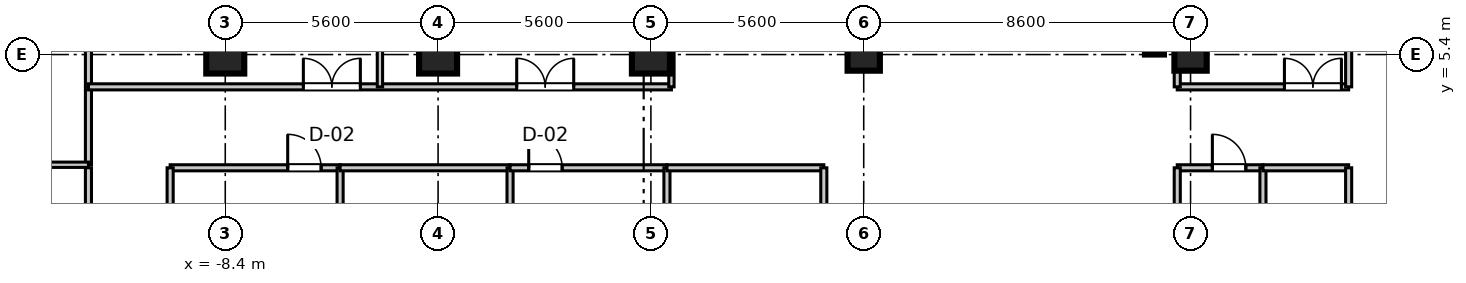
"""IFC4 building model, lengths in metres.
Left out: names, types, materials, properties, quantities, classifications, styles, units other than length and angle.
Written with IfcOpenShell. Run it as: python <this file> out.ifc"""

import sys

from ifc_helpers import new_model, si_unit, direction, frame, frame_2d, origin, origin_2d, place, context, subcontext, project, spatial, rectangle, extrude, source, transform, mapped, element, fill, save


model = new_model("IFC4")
c1 = context("Model", 3, precision=1e-05, world=origin(), true_north=direction((0.0, 1.0)))
c2 = subcontext(c1, "Body", "Model", "MODEL_VIEW")
j1 = project(units=[si_unit("LENGTHUNIT", "METRE"), si_unit("PLANEANGLEUNIT", "RADIAN")], contexts=[c1])
p1 = place(None, origin())
s1 = spatial("IfcSite", under=j1, at=p1, CompositionType="ELEMENT")
p2 = place(p1, origin())
s2 = spatial("IfcBuilding", under=s1, at=p2, CompositionType="ELEMENT")
p3 = place(p2, frame((0.0, 0.0, 212.3)))
s3 = spatial("IfcBuildingStorey", under=s2, at=p3, CompositionType="ELEMENT", Elevation=212.3)
m1 = source(origin(), c2, "Body", "SweptSolid", [
    extrude(rectangle(XDim=1.0, YDim=1.0, at=origin_2d()), origin(), (0.0, 0.0, 1.0), 3.655),
])
for number, where, z_axis, x_axis in (
    (1, (-8.4, 5.4, 0.0), (0.0, 0.0, 1.0), (1.0, 0.0, 0.0)),
    (2, (-2.8, 5.4, 0.0), (0.0, 0.0, 1.0), (1.0, 0.0, 0.0)),
    (3, (2.8, 5.4, 0.0), (0.0, 0.0, 1.0), (1.0, 0.0, 0.0)),
):
    element("IfcColumn", number, at=place(p3, frame(where, z_axis=z_axis, x_axis=x_axis)), inside=s3, PredefinedType="COLUMN", context=c2, shape_type="MappedRepresentation", body=[
        mapped(m1, transform((0.0, 0.0, 0.0), scale=1.0)),
    ])
m2 = source(origin(), c2, "Body", "SweptSolid", [
    extrude(rectangle(XDim=0.85, YDim=0.85, at=origin_2d()), origin(), (0.0, 0.0, 1.0), 3.655),
])
for number, where, z_axis, x_axis in (
    (4, (8.4, 5.4, 0.0), (0.0, 0.0, 1.0), (1.0, 0.0, 0.0)),
    (5, (17.0, 5.4, 0.0), (0.0, 0.0, 1.0), (1.0, 0.0, 0.0)),
):
    element("IfcColumn", number, at=place(p3, frame(where, z_axis=z_axis, x_axis=x_axis)), inside=s3, PredefinedType="PILASTER", context=c2, shape_type="MappedRepresentation", body=[
        mapped(m2, transform((0.0, 0.0, 0.0), scale=1.0)),
    ])
m3 = source(origin(), c2, "Body", "SweptSolid", [
    extrude(rectangle(XDim=11.6, YDim=0.5, at=frame_2d((5.8, 0.0))), origin(), (0.0, 0.0, 1.0), 3.41),
])
p4 = place(p3, frame((16.05, 5.4, 0.0), z_axis=(0.0, 0.0, 1.0), x_axis=(0.0, 1.0, 0.0)))
e6 = element("IfcWall", 6, at=p4, inside=s3, PredefinedType="SHEAR", context=c2, shape_type="MappedRepresentation", body=[
    mapped(m3, transform((0.0, 0.0, 0.0), scale=1.0)),
])
m4 = source(origin(), c2, "Body", "SweptSolid", [
    extrude(rectangle(XDim=4.51, YDim=0.16, at=frame_2d((2.255, 0.0))), origin(), (0.0, 0.0, 1.0), 2.75),
])
p5 = place(p3, frame((16.65, 4.55, 0.0), z_axis=(0.0, 0.0, 1.0), x_axis=(1.0, 0.0, 0.0)))
e7 = element("IfcWall", 7, at=p5, inside=s3, PredefinedType="PARTITIONING", context=c2, shape_type="MappedRepresentation", body=[
    mapped(m4, transform((0.0, 0.0, 0.0), scale=1.0)),
])
p6 = place(p5, frame((2.82, 0.0, 0.0)))
e8 = element("IfcOpeningElement", 8, at=p6, cuts=e7, PredefinedType="OPENING", context=c2, shape_type="SweptSolid", body=[
    extrude(rectangle(XDim=1.5, YDim=2.15, at=frame_2d((0.75, 1.075))), frame((0.0, 0.09, 0.0), z_axis=(0.0, -1.0, 0.0), x_axis=(1.0, 0.0, 0.0)), (0.0, 0.0, 1.0), 0.18),
])
m5 = source(origin(), c2, "Body", "SweptSolid", [
    extrude(rectangle(XDim=19.35, YDim=0.16, at=frame_2d((9.675, 0.0))), origin(), (0.0, 0.0, 1.0), 2.75),
])
p7 = place(p3, frame((16.65, 4.55, 0.0), z_axis=(0.0, 0.0, 1.0), x_axis=(0.0, 1.0, 0.0)))
e9 = element("IfcWall", 9, at=p7, inside=s3, PredefinedType="PARTITIONING", context=c2, shape_type="MappedRepresentation", body=[
    mapped(m5, transform((0.0, 0.0, 0.0), scale=1.0)),
])
m6 = source(origin(), c2, "Body", "SweptSolid", [
    extrude(rectangle(XDim=17.93, YDim=0.16, at=frame_2d((8.965, 0.0))), origin(), (0.0, 0.0, 1.0), 2.75),
])
p8 = place(p3, frame((21.16, 4.55, 0.0), z_axis=(0.0, 0.0, 1.0), x_axis=(0.0, 1.0, 0.0)))
e10 = element("IfcWall", 10, at=p8, inside=s3, PredefinedType="PARTITIONING", context=c2, shape_type="MappedRepresentation", body=[
    mapped(m6, transform((0.0, 0.0, 0.0), scale=1.0)),
])
m7 = source(origin(), c2, "Body", "SweptSolid", [
    extrude(rectangle(XDim=21.4, YDim=0.16, at=frame_2d((10.7, 0.0))), origin(), (0.0, 0.0, 1.0), 2.75),
])
p9 = place(p3, frame((-12.0, 2.5, 0.0), z_axis=(0.0, 0.0, 1.0), x_axis=(0.0, 1.0, 0.0)))
e11 = element("IfcWall", 11, at=p9, inside=s3, PredefinedType="PARTITIONING", context=c2, shape_type="MappedRepresentation", body=[
    mapped(m7, transform((0.0, 0.0, 0.0), scale=1.0)),
])
p10 = place(p9, frame((8.15, 0.0, 0.0)))
e12 = element("IfcOpeningElement", 12, at=p10, cuts=e11, PredefinedType="OPENING", context=c2, shape_type="SweptSolid", body=[
    extrude(rectangle(XDim=0.95, YDim=2.1, at=frame_2d((0.475, 1.05))), frame((0.0, 0.09, 0.0), z_axis=(0.0, -1.0, 0.0), x_axis=(1.0, 0.0, 0.0)), (0.0, 0.0, 1.0), 0.18),
])
m8 = source(origin(), c2, "Body", "SweptSolid", [
    extrude(rectangle(XDim=9.16, YDim=0.14, at=frame_2d((4.58, 0.0))), origin(), (0.0, 0.0, 1.0), 2.75),
])
p11 = place(p3, frame((-21.16, 2.5, 0.0), z_axis=(0.0, 0.0, 1.0), x_axis=(1.0, 0.0, 0.0)))
e13 = element("IfcWall", 13, at=p11, inside=s3, PredefinedType="PARTITIONING", context=c2, shape_type="MappedRepresentation", body=[
    mapped(m8, transform((0.0, 0.0, 0.0), scale=1.0)),
])
m9 = source(origin(), c2, "Body", "SweptSolid", [
    extrude(rectangle(XDim=15.34, YDim=0.16, at=frame_2d((7.67, 0.0))), origin(), (0.0, 0.0, 1.0), 2.75),
])
p12 = place(p3, frame((-12.0, 4.55, 0.0), z_axis=(0.0, 0.0, 1.0), x_axis=(1.0, 0.0, 0.0)))
e14 = element("IfcWall", 14, at=p12, inside=s3, PredefinedType="PARTITIONING", context=c2, shape_type="MappedRepresentation", body=[
    mapped(m9, transform((0.0, 0.0, 0.0), scale=1.0)),
])
p13 = place(p12, frame((5.655, 0.0, 0.0)))
e15 = element("IfcOpeningElement", 15, at=p13, cuts=e14, PredefinedType="OPENING", context=c2, shape_type="SweptSolid", body=[
    extrude(rectangle(XDim=1.5, YDim=2.15, at=frame_2d((0.75, 1.075))), frame((0.0, 0.09, 0.0), z_axis=(0.0, -1.0, 0.0), x_axis=(1.0, 0.0, 0.0)), (0.0, 0.0, 1.0), 0.18),
])
p14 = place(p12, frame((11.269, 0.0, 0.0)))
e16 = element("IfcOpeningElement", 16, at=p14, cuts=e14, PredefinedType="OPENING", context=c2, shape_type="SweptSolid", body=[
    extrude(rectangle(XDim=1.5, YDim=2.15, at=frame_2d((0.75, 1.075))), frame((0.0, 0.09, 0.0), z_axis=(0.0, -1.0, 0.0), x_axis=(1.0, 0.0, 0.0)), (0.0, 0.0, 1.0), 0.18),
])
m10 = source(origin(), c2, "Body", "SweptSolid", [
    extrude(rectangle(XDim=19.35, YDim=0.14, at=frame_2d((9.675, 0.0))), origin(), (0.0, 0.0, 1.0), 2.75),
])
for number, where, z_axis, x_axis in (
    (17, (3.34, 4.55, 0.0), (0.0, 0.0, 1.0), (0.0, 1.0, 0.0)),
    (18, (-4.33, 4.55, 0.0), (0.0, 0.0, 1.0), (0.0, 1.0, 0.0)),
):
    element("IfcWall", number, at=place(p3, frame(where, z_axis=z_axis, x_axis=x_axis)), inside=s3, PredefinedType="PARTITIONING", context=c2, shape_type="MappedRepresentation", body=[
        mapped(m10, transform((0.0, 0.0, 0.0), scale=1.0)),
    ])
m11 = source(origin(), c2, "Body", "SweptSolid", [
    extrude(rectangle(XDim=4.84, YDim=0.16, at=frame_2d((2.42, 0.0))), origin(), (0.0, 0.0, 1.0), 2.75),
])
p15 = place(p3, frame((-12.0, -2.42, 0.0), z_axis=(0.0, 0.0, 1.0), x_axis=(0.0, 1.0, 0.0)))
e19 = element("IfcWall", 19, at=p15, inside=s3, PredefinedType="PARTITIONING", context=c2, shape_type="MappedRepresentation", body=[
    mapped(m11, transform((0.0, 0.0, 0.0), scale=1.0)),
])
p16 = place(p15, frame((1.945, 0.0, 0.0)))
e20 = element("IfcOpeningElement", 20, at=p16, cuts=e19, PredefinedType="OPENING", context=c2, shape_type="SweptSolid", body=[
    extrude(rectangle(XDim=0.95, YDim=2.1, at=frame_2d((0.475, 1.05))), frame((0.0, 0.09, 0.0), z_axis=(0.0, -1.0, 0.0), x_axis=(1.0, 0.0, 0.0)), (0.0, 0.0, 1.0), 0.18),
])
m12 = source(origin(), c2, "Body", "SweptSolid", [
    extrude(rectangle(XDim=4.472, YDim=0.16, at=frame_2d((2.236, 0.0))), origin(), (0.0, 0.0, 1.0), 2.75),
])
p17 = place(p3, frame((-9.85, 2.42, 0.0), z_axis=(0.0, 0.0, 1.0), x_axis=(1.0, 0.0, 0.0)))
e21 = element("IfcWall", 21, at=p17, inside=s3, PredefinedType="PARTITIONING", context=c2, shape_type="MappedRepresentation", body=[
    mapped(m12, transform((0.0, 0.0, 0.0), scale=1.0)),
])
p18 = place(p17, frame((3.093, 0.0, 0.0)))
e22 = element("IfcOpeningElement", 22, at=p18, cuts=e21, PredefinedType="OPENING", context=c2, shape_type="SweptSolid", body=[
    extrude(rectangle(XDim=0.88, YDim=2.1, at=frame_2d((0.44, 1.05))), frame((0.0, 0.09, 0.0), z_axis=(0.0, -1.0, 0.0), x_axis=(1.0, 0.0, 0.0)), (0.0, 0.0, 1.0), 0.18),
])
for number, where, z_axis, x_axis in (
    (23, (-9.85, -2.42, 0.0), (0.0, 0.0, 1.0), (0.0, 1.0, 0.0)),
    (24, (-5.378, -2.42, 0.0), (0.0, 0.0, 1.0), (0.0, 1.0, 0.0)),
):
    element("IfcWall", number, at=place(p3, frame(where, z_axis=z_axis, x_axis=x_axis)), inside=s3, PredefinedType="PARTITIONING", context=c2, shape_type="MappedRepresentation", body=[
        mapped(m11, transform((0.0, 0.0, 0.0), scale=1.0)),
    ])
m13 = source(origin(), c2, "Body", "SweptSolid", [
    extrude(rectangle(XDim=4.472, YDim=0.16, at=frame_2d((2.236, 0.0))), origin(), (0.0, 0.0, 1.0), 2.75),
])
p19 = place(p3, frame((-5.378, 2.42, 0.0), z_axis=(0.0, 0.0, 1.0), x_axis=(1.0, 0.0, 0.0)))
e25 = element("IfcWall", 25, at=p19, inside=s3, PredefinedType="PARTITIONING", context=c2, shape_type="MappedRepresentation", body=[
    mapped(m13, transform((0.0, 0.0, 0.0), scale=1.0)),
])
p20 = place(p3, frame((-0.906, -2.42, 0.0), z_axis=(0.0, 0.0, 1.0), x_axis=(0.0, 1.0, 0.0)))
e26 = element("IfcWall", 26, at=p20, inside=s3, PredefinedType="PARTITIONING", context=c2, shape_type="MappedRepresentation", body=[
    mapped(m11, transform((0.0, 0.0, 0.0), scale=1.0)),
])
m14 = source(origin(), c2, "Body", "SweptSolid", [
    extrude(rectangle(XDim=4.128, YDim=0.16, at=frame_2d((2.064, 0.0))), origin(), (0.0, 0.0, 1.0), 2.75),
])
p21 = place(p3, frame((-0.906, 2.42, 0.0), z_axis=(0.0, 0.0, 1.0), x_axis=(1.0, 0.0, 0.0)))
e27 = element("IfcWall", 27, at=p21, inside=s3, PredefinedType="PARTITIONING", context=c2, shape_type="MappedRepresentation", body=[
    mapped(m14, transform((0.0, 0.0, 0.0), scale=1.0)),
])
p22 = place(p21, frame((0.491, 0.0, 0.0)))
e28 = element("IfcOpeningElement", 28, at=p22, cuts=e27, PredefinedType="OPENING", context=c2, shape_type="SweptSolid", body=[
    extrude(rectangle(XDim=0.88, YDim=2.1, at=frame_2d((0.44, 1.05))), frame((0.0, 0.09, 0.0), z_axis=(0.0, -1.0, 0.0), x_axis=(1.0, 0.0, 0.0)), (0.0, 0.0, 1.0), 0.18),
])
p23 = place(p3, frame((3.222, -2.42, 0.0), z_axis=(0.0, 0.0, 1.0), x_axis=(0.0, 1.0, 0.0)))
e29 = element("IfcWall", 29, at=p23, inside=s3, PredefinedType="PARTITIONING", context=c2, shape_type="MappedRepresentation", body=[
    mapped(m11, transform((0.0, 0.0, 0.0), scale=1.0)),
])
m15 = source(origin(), c2, "Body", "SweptSolid", [
    extrude(rectangle(XDim=4.128, YDim=0.16, at=frame_2d((2.064, 0.0))), origin(), (0.0, 0.0, 1.0), 2.75),
])
p24 = place(p3, frame((3.222, 2.42, 0.0), z_axis=(0.0, 0.0, 1.0), x_axis=(1.0, 0.0, 0.0)))
e30 = element("IfcWall", 30, at=p24, inside=s3, PredefinedType="PARTITIONING", context=c2, shape_type="MappedRepresentation", body=[
    mapped(m15, transform((0.0, 0.0, 0.0), scale=1.0)),
])
p25 = place(p3, frame((7.35, -2.42, 0.0), z_axis=(0.0, 0.0, 1.0), x_axis=(0.0, 1.0, 0.0)))
e31 = element("IfcWall", 31, at=p25, inside=s3, PredefinedType="PARTITIONING", context=c2, shape_type="MappedRepresentation", body=[
    mapped(m11, transform((0.0, 0.0, 0.0), scale=1.0)),
])
m16 = source(origin(), c2, "Body", "SweptSolid", [
    extrude(rectangle(XDim=2.255, YDim=0.16, at=frame_2d((1.127, 0.0))), origin(), (0.0, 0.0, 1.0), 2.75),
])
p26 = place(p3, frame((16.65, 2.42, 0.0), z_axis=(0.0, 0.0, 1.0), x_axis=(1.0, 0.0, 0.0)))
e32 = element("IfcWall", 32, at=p26, inside=s3, PredefinedType="PARTITIONING", context=c2, shape_type="MappedRepresentation", body=[
    mapped(m16, transform((0.0, 0.0, 0.0), scale=1.0)),
])
p27 = place(p26, frame((0.924, 0.0, 0.0)))
e33 = element("IfcOpeningElement", 33, at=p27, cuts=e32, PredefinedType="OPENING", context=c2, shape_type="SweptSolid", body=[
    extrude(rectangle(XDim=0.88, YDim=2.1, at=frame_2d((0.44, 1.05))), frame((0.0, 0.09, 0.0), z_axis=(0.0, -1.0, 0.0), x_axis=(1.0, 0.0, 0.0)), (0.0, 0.0, 1.0), 0.18),
])
for number, where, z_axis, x_axis in (
    (34, (16.65, -2.42, 0.0), (0.0, 0.0, 1.0), (0.0, 1.0, 0.0)),
    (35, (18.905, -2.42, 0.0), (0.0, 0.0, 1.0), (0.0, 1.0, 0.0)),
):
    element("IfcWall", number, at=place(p3, frame(where, z_axis=z_axis, x_axis=x_axis)), inside=s3, PredefinedType="PARTITIONING", context=c2, shape_type="MappedRepresentation", body=[
        mapped(m11, transform((0.0, 0.0, 0.0), scale=1.0)),
    ])
m17 = source(origin(), c2, "Body", "SweptSolid", [
    extrude(rectangle(XDim=2.255, YDim=0.16, at=frame_2d((1.127, 0.0))), origin(), (0.0, 0.0, 1.0), 2.75),
])
p28 = place(p3, frame((18.905, 2.42, 0.0), z_axis=(0.0, 0.0, 1.0), x_axis=(1.0, 0.0, 0.0)))
e36 = element("IfcWall", 36, at=p28, inside=s3, PredefinedType="PARTITIONING", context=c2, shape_type="MappedRepresentation", body=[
    mapped(m17, transform((0.0, 0.0, 0.0), scale=1.0)),
])
p29 = place(p3, frame((21.16, -2.42, 0.0), z_axis=(0.0, 0.0, 1.0), x_axis=(0.0, 1.0, 0.0)))
e37 = element("IfcWall", 37, at=p29, inside=s3, PredefinedType="PARTITIONING", context=c2, shape_type="MappedRepresentation", body=[
    mapped(m11, transform((0.0, 0.0, 0.0), scale=1.0)),
])
m18 = source(origin(), c2, "Body", "SweptSolid", [
    extrude(rectangle(XDim=1.5, YDim=2.15, at=frame_2d((0.75, 1.075))), frame((0.0, 0.025, 0.0), z_axis=(0.0, -1.0, 0.0), x_axis=(1.0, 0.0, 0.0)), (0.0, 0.0, 1.0), 0.05),
])
p30 = place(p6, origin())
e38 = element("IfcDoor", 38, at=p30, inside=s3, OperationType="DOUBLE_DOOR_SINGLE_SWING", PredefinedType="DOOR", context=c2, shape_type="MappedRepresentation", body=[
    mapped(m18, transform((0.0, 0.0, 0.0), scale=1.0)),
])
fill(e8, e38)
p31 = place(p13, origin())
e39 = element("IfcDoor", 39, at=p31, inside=s3, OperationType="DOUBLE_DOOR_SINGLE_SWING", PredefinedType="DOOR", context=c2, shape_type="MappedRepresentation", body=[
    mapped(m18, transform((0.0, 0.0, 0.0), scale=1.0)),
])
fill(e15, e39)
p32 = place(p14, origin())
e40 = element("IfcDoor", 40, at=p32, inside=s3, OperationType="DOUBLE_DOOR_SINGLE_SWING", PredefinedType="DOOR", context=c2, shape_type="MappedRepresentation", body=[
    mapped(m18, transform((0.0, 0.0, 0.0), scale=1.0)),
])
fill(e16, e40)
m19 = source(origin(), c2, "Body", "SweptSolid", [
    extrude(rectangle(XDim=0.88, YDim=2.1, at=frame_2d((0.44, 1.05))), frame((0.0, 0.025, 0.0), z_axis=(0.0, -1.0, 0.0), x_axis=(1.0, 0.0, 0.0)), (0.0, 0.0, 1.0), 0.05),
])
p33 = place(p18, frame((0.88, 0.0, 0.0), z_axis=(0.0, 0.0, 1.0), x_axis=(-1.0, 0.0, 0.0)))
e41 = element("IfcDoor", 41, at=p33, inside=s3, OperationType="SINGLE_SWING_LEFT", PredefinedType="DOOR", context=c2, shape_type="MappedRepresentation", body=[
    mapped(m19, transform((0.0, 0.0, 0.0), scale=1.0)),
])
fill(e22, e41)
p34 = place(p22, frame((0.88, 0.0, 0.0), z_axis=(0.0, 0.0, 1.0), x_axis=(-1.0, 0.0, 0.0)))
e42 = element("IfcDoor", 42, at=p34, inside=s3, OperationType="SINGLE_SWING_LEFT", PredefinedType="DOOR", context=c2, shape_type="MappedRepresentation", body=[
    mapped(m19, transform((0.0, 0.0, 0.0), scale=1.0)),
])
fill(e28, e42)
p35 = place(p27, frame((0.88, 0.0, 0.0), z_axis=(0.0, 0.0, 1.0), x_axis=(-1.0, 0.0, 0.0)))
e43 = element("IfcDoor", 43, at=p35, inside=s3, OperationType="SINGLE_SWING_LEFT", PredefinedType="DOOR", context=c2, shape_type="MappedRepresentation", body=[
    mapped(m19, transform((0.0, 0.0, 0.0), scale=1.0)),
])
fill(e33, e43)
save(model, sys.argv[1])
